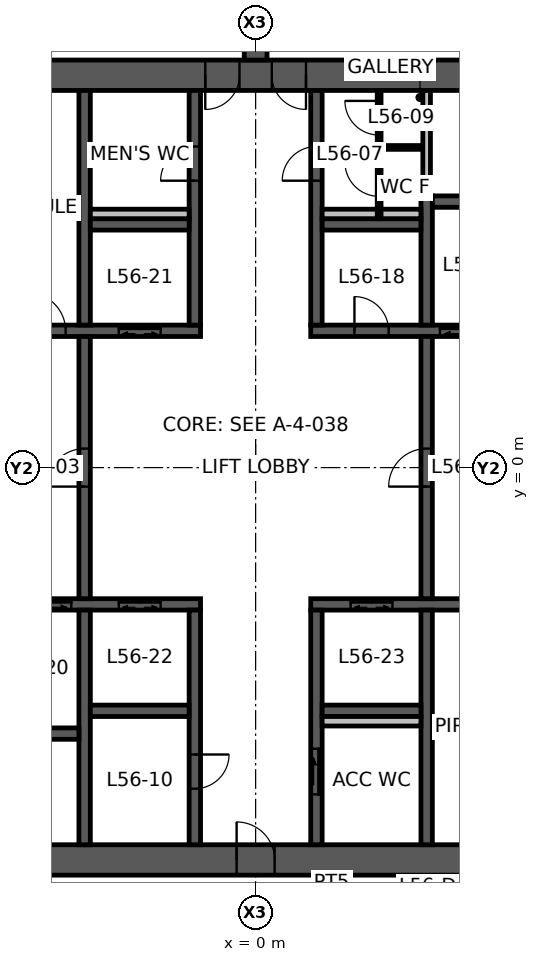
"""IFC4 building model, lengths in metres.
Left out: names, types, materials, properties, quantities, classifications, styles, units other than length and angle.
Written with IfcOpenShell. Run it as: python <this file> out.ifc"""

import sys

from ifc_helpers import new_model, si_unit, direction, frame, frame_2d, origin, place, context, subcontext, project, spatial, polyline, rectangle, outline, extrude, element, fill, save


model = new_model("IFC4")
c1 = context("Model", 3, precision=1e-05, world=origin(), true_north=direction((0.0, 1.0)))
c2 = subcontext(c1, "Body", "Model", "MODEL_VIEW")
j1 = project(units=[si_unit("LENGTHUNIT", "METRE"), si_unit("PLANEANGLEUNIT", "RADIAN")], contexts=[c1])
p1 = place(None, origin())
s1 = spatial("IfcSite", under=j1, at=p1, CompositionType="ELEMENT")
p2 = place(p1, origin())
s2 = spatial("IfcBuilding", under=s1, at=p2, CompositionType="ELEMENT")
p3 = place(p2, frame((0.0, 0.0, 224.5)))
s3 = spatial("IfcBuildingStorey", under=s2, at=p3, CompositionType="ELEMENT", Elevation=224.5)
p4 = place(p3, frame((5.961, 10.325, 0.0), z_axis=(0.0, 0.0, 1.0), x_axis=(-1.0, 0.0, 0.0)))
e1 = element("IfcWall", 1, at=p4, inside=s3, PredefinedType="SHEAR", context=c2, shape_type="SweptSolid", body=[
    extrude(outline(polyline([(-0.231, -0.4), (4.636, -0.4), (5.536, -0.4), (6.386, -0.4), (7.286, -0.4), (12.153, -0.4), (11.691, 0.4), (7.286, 0.4), (6.386, 0.4), (5.536, 0.4), (4.636, 0.4), (0.231, 0.4), (-0.231, -0.4)])), origin(), (0.0, 0.0, 1.0), 3.9),
])
p5 = place(p4, frame((6.386, 0.0, 0.0)))
e2 = element("IfcOpeningElement", 2, at=p5, cuts=e1, PredefinedType="OPENING", context=c2, shape_type="SweptSolid", body=[
    extrude(rectangle(XDim=0.9, YDim=2.1, at=frame_2d((0.45, 1.05))), frame((0.0, 0.41, 0.0), z_axis=(0.0, -1.0, 0.0), x_axis=(1.0, 0.0, 0.0)), (0.0, 0.0, 1.0), 0.82),
])
p6 = place(p4, frame((4.636, 0.0, 0.0)))
e3 = element("IfcOpeningElement", 3, at=p6, cuts=e1, PredefinedType="OPENING", context=c2, shape_type="SweptSolid", body=[
    extrude(rectangle(XDim=0.9, YDim=2.1, at=frame_2d((0.45, 1.05))), frame((0.0, 0.41, 0.0), z_axis=(0.0, -1.0, 0.0), x_axis=(1.0, 0.0, 0.0)), (0.0, 0.0, 1.0), 0.82),
])
p7 = place(p3, frame((-5.961, -10.325, 0.0), z_axis=(0.0, 0.0, 1.0), x_axis=(1.0, 0.0, 0.0)))
e4 = element("IfcWall", 4, at=p7, inside=s3, PredefinedType="SHEAR", context=c2, shape_type="SweptSolid", body=[
    extrude(outline(polyline([(-0.231, -0.4), (5.461, -0.4), (6.461, -0.4), (12.153, -0.4), (11.691, 0.4), (6.461, 0.4), (5.461, 0.4), (0.231, 0.4), (-0.231, -0.4)])), origin(), (0.0, 0.0, 1.0), 3.9),
])
p8 = place(p7, frame((5.461, 0.0, 0.0)))
e5 = element("IfcOpeningElement", 5, at=p8, cuts=e4, PredefinedType="OPENING", context=c2, shape_type="SweptSolid", body=[
    extrude(rectangle(XDim=1.0, YDim=2.1, at=frame_2d((0.5, 1.05))), frame((0.0, 0.41, 0.0), z_axis=(0.0, -1.0, 0.0), x_axis=(1.0, 0.0, 0.0)), (0.0, 0.0, 1.0), 0.82),
])
p9 = place(p3, frame((0.0, 10.725, 0.0), z_axis=(0.0, 0.0, 1.0), x_axis=(0.0, 1.0, 0.0)))
e6 = element("IfcWall", 6, at=p9, inside=s3, PredefinedType="SHEAR", context=c2, shape_type="SweptSolid", body=[
    extrude(rectangle(XDim=7.045, YDim=0.6, at=frame_2d((3.523, 0.0))), origin(), (0.0, 0.0, 1.0), 3.9),
])
p10 = place(p9, frame((1.0, 0.0, 0.0)))
e7 = element("IfcOpeningElement", 7, at=p10, cuts=e6, PredefinedType="OPENING", context=c2, shape_type="SweptSolid", body=[
    extrude(rectangle(XDim=1.0, YDim=2.1, at=frame_2d((0.5, 1.05))), frame((0.0, 0.31, 0.0), z_axis=(0.0, -1.0, 0.0), x_axis=(1.0, 0.0, 0.0)), (0.0, 0.0, 1.0), 0.62),
])
p11 = place(p3, frame((-9.382, 3.6, 0.0), z_axis=(0.0, 0.0, 1.0), x_axis=(1.0, 0.0, 0.0)))
e8 = element("IfcWall", 8, at=p11, inside=s3, PredefinedType="SHEAR", context=c2, shape_type="SweptSolid", body=[
    extrude(outline(polyline([(-0.087, -0.15), (3.382, -0.15), (4.382, -0.15), (5.782, -0.15), (6.882, -0.15), (7.932, -0.15), (7.932, 0.15), (6.882, 0.15), (5.782, 0.15), (4.382, 0.15), (3.382, 0.15), (0.087, 0.15), (-0.087, -0.15)])), origin(), (0.0, 0.0, 1.0), 3.9),
])
p12 = place(p11, frame((3.382, 0.0, 0.0)))
e9 = element("IfcOpeningElement", 9, at=p12, cuts=e8, PredefinedType="OPENING", context=c2, shape_type="SweptSolid", body=[
    extrude(rectangle(XDim=1.0, YDim=2.1, at=frame_2d((0.5, 1.05))), frame((0.0, 0.16, 0.0), z_axis=(0.0, -1.0, 0.0), x_axis=(1.0, 0.0, 0.0)), (0.0, 0.0, 1.0), 0.32),
])
p13 = place(p11, frame((5.782, 0.0, 0.0)))
e10 = element("IfcOpeningElement", 10, at=p13, cuts=e8, PredefinedType="OPENING", context=c2, shape_type="SweptSolid", body=[
    extrude(rectangle(XDim=1.1, YDim=2.1, at=frame_2d((0.55, 1.05))), frame((0.0, 0.16, 0.0), z_axis=(0.0, -1.0, 0.0), x_axis=(1.0, 0.0, 0.0)), (0.0, 0.0, 1.0), 0.32),
])
p14 = place(p3, frame((1.45, 3.6, 0.0), z_axis=(0.0, 0.0, 1.0), x_axis=(1.0, 0.0, 0.0)))
e11 = element("IfcWall", 11, at=p14, inside=s3, PredefinedType="SHEAR", context=c2, shape_type="SweptSolid", body=[
    extrude(outline(polyline([(0.0, -0.15), (1.15, -0.15), (2.05, -0.15), (3.4, -0.15), (4.7, -0.15), (8.019, -0.15), (7.845, 0.15), (4.7, 0.15), (3.4, 0.15), (2.05, 0.15), (1.15, 0.15), (0.0, 0.15), (0.0, -0.15)])), origin(), (0.0, 0.0, 1.0), 3.9),
])
p15 = place(p14, frame((1.15, 0.0, 0.0)))
e12 = element("IfcOpeningElement", 12, at=p15, cuts=e11, PredefinedType="OPENING", context=c2, shape_type="SweptSolid", body=[
    extrude(rectangle(XDim=0.9, YDim=2.1, at=frame_2d((0.45, 1.05))), frame((0.0, 0.16, 0.0), z_axis=(0.0, -1.0, 0.0), x_axis=(1.0, 0.0, 0.0)), (0.0, 0.0, 1.0), 0.32),
])
p16 = place(p14, frame((3.4, 0.0, 0.0)))
e13 = element("IfcOpeningElement", 13, at=p16, cuts=e11, PredefinedType="OPENING", context=c2, shape_type="SweptSolid", body=[
    extrude(rectangle(XDim=1.3, YDim=2.1, at=frame_2d((0.65, 1.05))), frame((0.0, 0.16, 0.0), z_axis=(0.0, -1.0, 0.0), x_axis=(1.0, 0.0, 0.0)), (0.0, 0.0, 1.0), 0.32),
])
p17 = place(p3, frame((-9.382, -3.6, 0.0), z_axis=(0.0, 0.0, 1.0), x_axis=(1.0, 0.0, 0.0)))
e14 = element("IfcWall", 14, at=p17, inside=s3, PredefinedType="SHEAR", context=c2, shape_type="SweptSolid", body=[
    extrude(outline(polyline([(0.087, -0.15), (3.232, -0.15), (4.532, -0.15), (5.782, -0.15), (6.882, -0.15), (7.932, -0.15), (7.932, 0.15), (6.882, 0.15), (5.782, 0.15), (4.532, 0.15), (3.232, 0.15), (-0.087, 0.15), (0.087, -0.15)])), origin(), (0.0, 0.0, 1.0), 3.9),
])
p18 = place(p17, frame((5.782, 0.0, 0.0)))
e15 = element("IfcOpeningElement", 15, at=p18, cuts=e14, PredefinedType="OPENING", context=c2, shape_type="SweptSolid", body=[
    extrude(rectangle(XDim=1.1, YDim=2.1, at=frame_2d((0.55, 1.05))), frame((0.0, 0.16, 0.0), z_axis=(0.0, -1.0, 0.0), x_axis=(1.0, 0.0, 0.0)), (0.0, 0.0, 1.0), 0.32),
])
p19 = place(p17, frame((3.232, 0.0, 0.0)))
e16 = element("IfcOpeningElement", 16, at=p19, cuts=e14, PredefinedType="OPENING", context=c2, shape_type="SweptSolid", body=[
    extrude(rectangle(XDim=1.3, YDim=2.1, at=frame_2d((0.65, 1.05))), frame((0.0, 0.16, 0.0), z_axis=(0.0, -1.0, 0.0), x_axis=(1.0, 0.0, 0.0)), (0.0, 0.0, 1.0), 0.32),
])
p20 = place(p3, frame((1.45, -3.6, 0.0), z_axis=(0.0, 0.0, 1.0), x_axis=(1.0, 0.0, 0.0)))
e17 = element("IfcWall", 17, at=p20, inside=s3, PredefinedType="SHEAR", context=c2, shape_type="SweptSolid", body=[
    extrude(outline(polyline([(0.0, -0.15), (1.05, -0.15), (2.15, -0.15), (7.845, -0.15), (8.019, 0.15), (2.15, 0.15), (1.05, 0.15), (0.0, 0.15), (0.0, -0.15)])), origin(), (0.0, 0.0, 1.0), 3.9),
])
p21 = place(p20, frame((1.05, 0.0, 0.0)))
e18 = element("IfcOpeningElement", 18, at=p21, cuts=e17, PredefinedType="OPENING", context=c2, shape_type="SweptSolid", body=[
    extrude(rectangle(XDim=1.1, YDim=2.1, at=frame_2d((0.55, 1.05))), frame((0.0, 0.16, 0.0), z_axis=(0.0, -1.0, 0.0), x_axis=(1.0, 0.0, 0.0)), (0.0, 0.0, 1.0), 0.32),
])
p22 = place(p3, frame((-1.6, 3.75, 0.0), z_axis=(0.0, 0.0, 1.0), x_axis=(0.0, 1.0, 0.0)))
e19 = element("IfcWall", 19, at=p22, inside=s3, PredefinedType="SHEAR", context=c2, shape_type="SweptSolid", body=[
    extrude(rectangle(XDim=6.175, YDim=0.3, at=frame_2d((3.087, 0.0))), origin(), (0.0, 0.0, 1.0), 3.9),
])
p23 = place(p22, frame((3.8, 0.0, 0.0)))
e20 = element("IfcOpeningElement", 20, at=p23, cuts=e19, PredefinedType="OPENING", context=c2, shape_type="SweptSolid", body=[
    extrude(rectangle(XDim=0.9, YDim=2.1, at=frame_2d((0.45, 1.05))), frame((0.0, 0.16, 0.0), z_axis=(0.0, -1.0, 0.0), x_axis=(1.0, 0.0, 0.0)), (0.0, 0.0, 1.0), 0.32),
])
p24 = place(p3, frame((1.6, 3.75, 0.0), z_axis=(0.0, 0.0, 1.0), x_axis=(0.0, 1.0, 0.0)))
e21 = element("IfcWall", 21, at=p24, inside=s3, PredefinedType="SHEAR", context=c2, shape_type="SweptSolid", body=[
    extrude(rectangle(XDim=6.175, YDim=0.3, at=frame_2d((3.087, 0.0))), origin(), (0.0, 0.0, 1.0), 3.9),
])
p25 = place(p24, frame((3.8, 0.0, 0.0)))
e22 = element("IfcOpeningElement", 22, at=p25, cuts=e21, PredefinedType="OPENING", context=c2, shape_type="SweptSolid", body=[
    extrude(rectangle(XDim=0.9, YDim=2.1, at=frame_2d((0.45, 1.05))), frame((0.0, 0.16, 0.0), z_axis=(0.0, -1.0, 0.0), x_axis=(1.0, 0.0, 0.0)), (0.0, 0.0, 1.0), 0.32),
])
p26 = place(p3, frame((-1.6, -3.75, 0.0), z_axis=(0.0, 0.0, 1.0), x_axis=(0.0, -1.0, 0.0)))
e23 = element("IfcWall", 23, at=p26, inside=s3, PredefinedType="SHEAR", context=c2, shape_type="SweptSolid", body=[
    extrude(rectangle(XDim=6.175, YDim=0.3, at=frame_2d((3.087, 0.0))), origin(), (0.0, 0.0, 1.0), 3.9),
])
p27 = place(p26, frame((3.8, 0.0, 0.0)))
e24 = element("IfcOpeningElement", 24, at=p27, cuts=e23, PredefinedType="OPENING", context=c2, shape_type="SweptSolid", body=[
    extrude(rectangle(XDim=0.9, YDim=2.1, at=frame_2d((0.45, 1.05))), frame((0.0, 0.16, 0.0), z_axis=(0.0, -1.0, 0.0), x_axis=(1.0, 0.0, 0.0)), (0.0, 0.0, 1.0), 0.32),
])
p28 = place(p3, frame((1.6, -3.75, 0.0), z_axis=(0.0, 0.0, 1.0), x_axis=(0.0, -1.0, 0.0)))
e25 = element("IfcWall", 25, at=p28, inside=s3, PredefinedType="SHEAR", context=c2, shape_type="SweptSolid", body=[
    extrude(rectangle(XDim=6.175, YDim=0.3, at=frame_2d((3.087, 0.0))), origin(), (0.0, 0.0, 1.0), 3.9),
])
p29 = place(p28, frame((3.65, 0.0, 0.0)))
e26 = element("IfcOpeningElement", 26, at=p29, cuts=e25, PredefinedType="OPENING", context=c2, shape_type="SweptSolid", body=[
    extrude(rectangle(XDim=1.2, YDim=2.1, at=frame_2d((0.6, 1.05))), frame((0.0, 0.16, 0.0), z_axis=(0.0, -1.0, 0.0), x_axis=(1.0, 0.0, 0.0)), (0.0, 0.0, 1.0), 0.32),
])
p30 = place(p3, frame((-4.5, -3.45, 0.0), z_axis=(0.0, 0.0, 1.0), x_axis=(0.0, 1.0, 0.0)))
e27 = element("IfcWall", 27, at=p30, inside=s3, PredefinedType="SHEAR", context=c2, shape_type="SweptSolid", body=[
    extrude(rectangle(XDim=6.9, YDim=0.3, at=frame_2d((3.45, 0.0))), origin(), (0.0, 0.0, 1.0), 3.9),
])
p31 = place(p30, frame((2.95, 0.0, 0.0)))
e28 = element("IfcOpeningElement", 28, at=p31, cuts=e27, PredefinedType="OPENING", context=c2, shape_type="SweptSolid", body=[
    extrude(rectangle(XDim=1.0, YDim=2.1, at=frame_2d((0.5, 1.05))), frame((0.0, 0.16, 0.0), z_axis=(0.0, -1.0, 0.0), x_axis=(1.0, 0.0, 0.0)), (0.0, 0.0, 1.0), 0.32),
])
p32 = place(p3, frame((4.5, -3.45, 0.0), z_axis=(0.0, 0.0, 1.0), x_axis=(0.0, 1.0, 0.0)))
e29 = element("IfcWall", 29, at=p32, inside=s3, PredefinedType="SHEAR", context=c2, shape_type="SweptSolid", body=[
    extrude(rectangle(XDim=6.9, YDim=0.3, at=frame_2d((3.45, 0.0))), origin(), (0.0, 0.0, 1.0), 3.9),
])
p33 = place(p32, frame((2.95, 0.0, 0.0)))
e30 = element("IfcOpeningElement", 30, at=p33, cuts=e29, PredefinedType="OPENING", context=c2, shape_type="SweptSolid", body=[
    extrude(rectangle(XDim=1.0, YDim=2.1, at=frame_2d((0.5, 1.05))), frame((0.0, 0.16, 0.0), z_axis=(0.0, -1.0, 0.0), x_axis=(1.0, 0.0, 0.0)), (0.0, 0.0, 1.0), 0.32),
])
p34 = place(p3, frame((-4.5, 3.75, 0.0), z_axis=(0.0, 0.0, 1.0), x_axis=(0.0, 1.0, 0.0)))
e31 = element("IfcWall", 31, at=p34, inside=s3, PredefinedType="SHEAR", context=c2, shape_type="SweptSolid", body=[
    extrude(rectangle(XDim=6.175, YDim=0.3, at=frame_2d((3.087, 0.0))), origin(), (0.0, 0.0, 1.0), 3.9),
])
p35 = place(p3, frame((4.5, 3.75, 0.0), z_axis=(0.0, 0.0, 1.0), x_axis=(0.0, 1.0, 0.0)))
e32 = element("IfcWall", 32, at=p35, inside=s3, PredefinedType="SHEAR", context=c2, shape_type="SweptSolid", body=[
    extrude(rectangle(XDim=3.4, YDim=0.3, at=frame_2d((1.7, 0.0))), origin(), (0.0, 0.0, 1.0), 3.9),
])
for number, where, z_axis, x_axis in (
    (33, (-4.5, -3.75, 0.0), (0.0, 0.0, 1.0), (0.0, -1.0, 0.0)),
    (34, (4.5, -3.75, 0.0), (0.0, 0.0, 1.0), (0.0, -1.0, 0.0)),
):
    element("IfcWall", number, at=place(p3, frame(where, z_axis=z_axis, x_axis=x_axis)), inside=s3, PredefinedType="SHEAR", context=c2, shape_type="SweptSolid", body=[
        extrude(rectangle(XDim=6.175, YDim=0.3, at=frame_2d((3.087, 0.0))), origin(), (0.0, 0.0, 1.0), 3.9),
    ])
for number, where, z_axis, x_axis in (
    (35, (-4.35, 6.4, 0.0), (0.0, 0.0, 1.0), (1.0, 0.0, 0.0)),
    (36, (1.75, 6.4, 0.0), (0.0, 0.0, 1.0), (1.0, 0.0, 0.0)),
    (37, (-4.35, -6.4, 0.0), (0.0, 0.0, 1.0), (1.0, 0.0, 0.0)),
    (38, (1.75, -6.4, 0.0), (0.0, 0.0, 1.0), (1.0, 0.0, 0.0)),
    (39, (-7.25, -7.0, 0.0), (0.0, 0.0, 1.0), (1.0, 0.0, 0.0)),
    (40, (4.65, 7.0, 0.0), (0.0, 0.0, 1.0), (1.0, 0.0, 0.0)),
):
    element("IfcWall", number, at=place(p3, frame(where, z_axis=z_axis, x_axis=x_axis)), inside=s3, PredefinedType="SHEAR", context=c2, shape_type="SweptSolid", body=[
        extrude(rectangle(XDim=2.6, YDim=0.3, at=frame_2d((1.3, 0.0))), origin(), (0.0, 0.0, 1.0), 3.9),
    ])
p36 = place(p3, frame((4.5, 7.15, 0.0), z_axis=(0.0, 0.0, 1.0), x_axis=(0.0, 1.0, 0.0)))
e41 = element("IfcWall", 41, at=p36, inside=s3, PredefinedType="STANDARD", context=c2, shape_type="SweptSolid", body=[
    extrude(rectangle(XDim=2.775, YDim=0.2, at=frame_2d((1.388, 0.0))), origin(), (0.0, 0.0, 1.0), 3.9),
])
for number, where, z_axis, x_axis in (
    (42, (-4.35, 6.675, 0.0), (0.0, 0.0, 1.0), (1.0, 0.0, 0.0)),
    (43, (1.75, 6.675, 0.0), (0.0, 0.0, 1.0), (1.0, 0.0, 0.0)),
    (44, (1.75, -6.675, 0.0), (0.0, 0.0, 1.0), (1.0, 0.0, 0.0)),
):
    element("IfcWall", number, at=place(p3, frame(where, z_axis=z_axis, x_axis=x_axis)), inside=s3, PredefinedType="PLUMBINGWALL", context=c2, shape_type="SweptSolid", body=[
        extrude(rectangle(XDim=2.6, YDim=0.25, at=frame_2d((1.3, 0.0))), origin(), (0.0, 0.0, 1.0), 3.9),
    ])
p37 = place(p3, frame((3.25, 6.55, 0.0), z_axis=(0.0, 0.0, 1.0), x_axis=(0.0, 1.0, 0.0)))
e45 = element("IfcWall", 45, at=p37, inside=s3, PredefinedType="PARTITIONING", context=c2, shape_type="SweptSolid", body=[
    extrude(rectangle(XDim=3.375, YDim=0.1, at=frame_2d((1.688, 0.0))), origin(), (0.0, 0.0, 1.0), 2.95),
])
p38 = place(p37, frame((0.587, 0.0, 0.0)))
e46 = element("IfcOpeningElement", 46, at=p38, cuts=e45, PredefinedType="OPENING", context=c2, shape_type="SweptSolid", body=[
    extrude(rectangle(XDim=0.9, YDim=2.1, at=frame_2d((0.45, 1.05))), frame((0.0, 0.06, 0.0), z_axis=(0.0, -1.0, 0.0), x_axis=(1.0, 0.0, 0.0)), (0.0, 0.0, 1.0), 0.12),
])
p39 = place(p37, frame((2.2, 0.0, 0.0)))
e47 = element("IfcOpeningElement", 47, at=p39, cuts=e45, PredefinedType="OPENING", context=c2, shape_type="SweptSolid", body=[
    extrude(rectangle(XDim=0.9, YDim=2.1, at=frame_2d((0.45, 1.05))), frame((0.0, 0.06, 0.0), z_axis=(0.0, -1.0, 0.0), x_axis=(1.0, 0.0, 0.0)), (0.0, 0.0, 1.0), 0.12),
])
p40 = place(p3, frame((3.3, 8.425, 0.0), z_axis=(0.0, 0.0, 1.0), x_axis=(1.0, 0.0, 0.0)))
e48 = element("IfcWall", 48, at=p40, inside=s3, PredefinedType="PARTITIONING", context=c2, shape_type="SweptSolid", body=[
    extrude(rectangle(XDim=1.05, YDim=0.1, at=frame_2d((0.525, 0.0))), origin(), (0.0, 0.0, 1.0), 2.95),
])
p41 = place(p3, frame((2.0, -13.325, 0.0), z_axis=(0.0, 0.0, 1.0), x_axis=(0.0, 1.0, 0.0)))
e49 = element("IfcWall", 49, at=p41, inside=s3, PredefinedType="PARTITIONING", context=c2, shape_type="SweptSolid", body=[
    extrude(rectangle(XDim=2.58, YDim=0.1, at=frame_2d((1.29, 0.0))), origin(), (0.0, 0.0, 1.0), 2.95),
])
p42 = place(p5, origin())
e50 = element("IfcDoor", 50, at=p42, inside=s3, OperationType="SINGLE_SWING_RIGHT", PredefinedType="DOOR", context=c2, shape_type="SweptSolid", body=[
    extrude(rectangle(XDim=0.9, YDim=2.1, at=frame_2d((0.45, 1.05))), frame((0.0, 0.025, 0.0), z_axis=(0.0, -1.0, 0.0), x_axis=(1.0, 0.0, 0.0)), (0.0, 0.0, 1.0), 0.05),
])
fill(e2, e50)
p43 = place(p6, origin())
e51 = element("IfcDoor", 51, at=p43, inside=s3, OperationType="SINGLE_SWING_LEFT", PredefinedType="DOOR", context=c2, shape_type="SweptSolid", body=[
    extrude(rectangle(XDim=0.9, YDim=2.1, at=frame_2d((0.45, 1.05))), frame((0.0, 0.025, 0.0), z_axis=(0.0, -1.0, 0.0), x_axis=(1.0, 0.0, 0.0)), (0.0, 0.0, 1.0), 0.05),
])
fill(e3, e51)
p44 = place(p8, origin())
e52 = element("IfcDoor", 52, at=p44, inside=s3, OperationType="SINGLE_SWING_LEFT", PredefinedType="DOOR", context=c2, shape_type="SweptSolid", body=[
    extrude(rectangle(XDim=1.0, YDim=2.1, at=frame_2d((0.5, 1.05))), frame((0.0, 0.025, 0.0), z_axis=(0.0, -1.0, 0.0), x_axis=(1.0, 0.0, 0.0)), (0.0, 0.0, 1.0), 0.05),
])
fill(e5, e52)
p45 = place(p33, origin())
e53 = element("IfcDoor", 53, at=p45, inside=s3, OperationType="SINGLE_SWING_LEFT", PredefinedType="DOOR", context=c2, shape_type="SweptSolid", body=[
    extrude(rectangle(XDim=1.0, YDim=2.1, at=frame_2d((0.5, 1.05))), frame((0.0, 0.025, 0.0), z_axis=(0.0, -1.0, 0.0), x_axis=(1.0, 0.0, 0.0)), (0.0, 0.0, 1.0), 0.05),
])
fill(e30, e53)
p46 = place(p31, origin())
e54 = element("IfcDoor", 54, at=p46, inside=s3, OperationType="SINGLE_SWING_LEFT", PredefinedType="DOOR", context=c2, shape_type="SweptSolid", body=[
    extrude(rectangle(XDim=1.0, YDim=2.1, at=frame_2d((0.5, 1.05))), frame((0.0, 0.025, 0.0), z_axis=(0.0, -1.0, 0.0), x_axis=(1.0, 0.0, 0.0)), (0.0, 0.0, 1.0), 0.05),
])
fill(e28, e54)
p47 = place(p12, origin())
e55 = element("IfcDoor", 55, at=p47, inside=s3, OperationType="SINGLE_SWING_LEFT", PredefinedType="DOOR", context=c2, shape_type="SweptSolid", body=[
    extrude(rectangle(XDim=1.0, YDim=2.1, at=frame_2d((0.5, 1.05))), frame((0.0, 0.025, 0.0), z_axis=(0.0, -1.0, 0.0), x_axis=(1.0, 0.0, 0.0)), (0.0, 0.0, 1.0), 0.05),
])
fill(e9, e55)
p48 = place(p23, origin())
e56 = element("IfcDoor", 56, at=p48, inside=s3, OperationType="SINGLE_SWING_LEFT", PredefinedType="DOOR", context=c2, shape_type="SweptSolid", body=[
    extrude(rectangle(XDim=0.9, YDim=2.1, at=frame_2d((0.45, 1.05))), frame((0.0, 0.025, 0.0), z_axis=(0.0, -1.0, 0.0), x_axis=(1.0, 0.0, 0.0)), (0.0, 0.0, 1.0), 0.05),
])
fill(e20, e56)
p49 = place(p25, origin())
e57 = element("IfcDoor", 57, at=p49, inside=s3, OperationType="SINGLE_SWING_LEFT", PredefinedType="DOOR", context=c2, shape_type="SweptSolid", body=[
    extrude(rectangle(XDim=0.9, YDim=2.1, at=frame_2d((0.45, 1.05))), frame((0.0, 0.025, 0.0), z_axis=(0.0, -1.0, 0.0), x_axis=(1.0, 0.0, 0.0)), (0.0, 0.0, 1.0), 0.05),
])
fill(e22, e57)
p50 = place(p29, origin())
e58 = element("IfcDoor", 58, at=p50, inside=s3, OperationType="SLIDING_TO_LEFT", PredefinedType="DOOR", context=c2, shape_type="SweptSolid", body=[
    extrude(rectangle(XDim=1.2, YDim=2.1, at=frame_2d((0.6, 1.05))), frame((0.0, 0.025, 0.0), z_axis=(0.0, -1.0, 0.0), x_axis=(1.0, 0.0, 0.0)), (0.0, 0.0, 1.0), 0.05),
])
fill(e26, e58)
p51 = place(p27, origin())
e59 = element("IfcDoor", 59, at=p51, inside=s3, OperationType="SINGLE_SWING_LEFT", PredefinedType="DOOR", context=c2, shape_type="SweptSolid", body=[
    extrude(rectangle(XDim=0.9, YDim=2.1, at=frame_2d((0.45, 1.05))), frame((0.0, 0.025, 0.0), z_axis=(0.0, -1.0, 0.0), x_axis=(1.0, 0.0, 0.0)), (0.0, 0.0, 1.0), 0.05),
])
fill(e24, e59)
p52 = place(p15, origin())
e60 = element("IfcDoor", 60, at=p52, inside=s3, OperationType="SINGLE_SWING_LEFT", PredefinedType="DOOR", context=c2, shape_type="SweptSolid", body=[
    extrude(rectangle(XDim=0.9, YDim=2.1, at=frame_2d((0.45, 1.05))), frame((0.0, 0.025, 0.0), z_axis=(0.0, -1.0, 0.0), x_axis=(1.0, 0.0, 0.0)), (0.0, 0.0, 1.0), 0.05),
])
fill(e12, e60)
p53 = place(p38, origin())
e61 = element("IfcDoor", 61, at=p53, inside=s3, OperationType="SINGLE_SWING_RIGHT", PredefinedType="DOOR", context=c2, shape_type="SweptSolid", body=[
    extrude(rectangle(XDim=0.9, YDim=2.1, at=frame_2d((0.45, 1.05))), frame((0.0, 0.025, 0.0), z_axis=(0.0, -1.0, 0.0), x_axis=(1.0, 0.0, 0.0)), (0.0, 0.0, 1.0), 0.05),
])
fill(e46, e61)
p54 = place(p39, origin())
e62 = element("IfcDoor", 62, at=p54, inside=s3, OperationType="SINGLE_SWING_RIGHT", PredefinedType="DOOR", context=c2, shape_type="SweptSolid", body=[
    extrude(rectangle(XDim=0.9, YDim=2.1, at=frame_2d((0.45, 1.05))), frame((0.0, 0.025, 0.0), z_axis=(0.0, -1.0, 0.0), x_axis=(1.0, 0.0, 0.0)), (0.0, 0.0, 1.0), 0.05),
])
fill(e47, e62)
p55 = place(p21, origin())
e63 = element("IfcDoor", 63, at=p55, inside=s3, OperationType="DOUBLE_DOOR_SLIDING", PredefinedType="DOOR", context=c2, shape_type="SweptSolid", body=[
    extrude(rectangle(XDim=1.1, YDim=2.1, at=frame_2d((0.55, 1.05))), frame((0.0, 0.025, 0.0), z_axis=(0.0, -1.0, 0.0), x_axis=(1.0, 0.0, 0.0)), (0.0, 0.0, 1.0), 0.05),
])
fill(e18, e63)
p56 = place(p13, origin())
e64 = element("IfcDoor", 64, at=p56, inside=s3, OperationType="DOUBLE_DOOR_SLIDING", PredefinedType="DOOR", context=c2, shape_type="SweptSolid", body=[
    extrude(rectangle(XDim=1.1, YDim=2.1, at=frame_2d((0.55, 1.05))), frame((0.0, 0.025, 0.0), z_axis=(0.0, -1.0, 0.0), x_axis=(1.0, 0.0, 0.0)), (0.0, 0.0, 1.0), 0.05),
])
fill(e10, e64)
p57 = place(p18, origin())
e65 = element("IfcDoor", 65, at=p57, inside=s3, OperationType="DOUBLE_DOOR_SLIDING", PredefinedType="DOOR", context=c2, shape_type="SweptSolid", body=[
    extrude(rectangle(XDim=1.1, YDim=2.1, at=frame_2d((0.55, 1.05))), frame((0.0, 0.025, 0.0), z_axis=(0.0, -1.0, 0.0), x_axis=(1.0, 0.0, 0.0)), (0.0, 0.0, 1.0), 0.05),
])
fill(e15, e65)
p58 = place(p16, origin())
e66 = element("IfcDoor", 66, at=p58, inside=s3, OperationType="DOUBLE_DOOR_SLIDING", PredefinedType="DOOR", context=c2, shape_type="SweptSolid", body=[
    extrude(rectangle(XDim=1.3, YDim=2.1, at=frame_2d((0.65, 1.05))), frame((0.0, 0.025, 0.0), z_axis=(0.0, -1.0, 0.0), x_axis=(1.0, 0.0, 0.0)), (0.0, 0.0, 1.0), 0.05),
])
fill(e13, e66)
p59 = place(p19, origin())
e67 = element("IfcDoor", 67, at=p59, inside=s3, OperationType="DOUBLE_DOOR_SLIDING", PredefinedType="DOOR", context=c2, shape_type="SweptSolid", body=[
    extrude(rectangle(XDim=1.3, YDim=2.1, at=frame_2d((0.65, 1.05))), frame((0.0, 0.025, 0.0), z_axis=(0.0, -1.0, 0.0), x_axis=(1.0, 0.0, 0.0)), (0.0, 0.0, 1.0), 0.05),
])
fill(e16, e67)
save(model, sys.argv[1])
